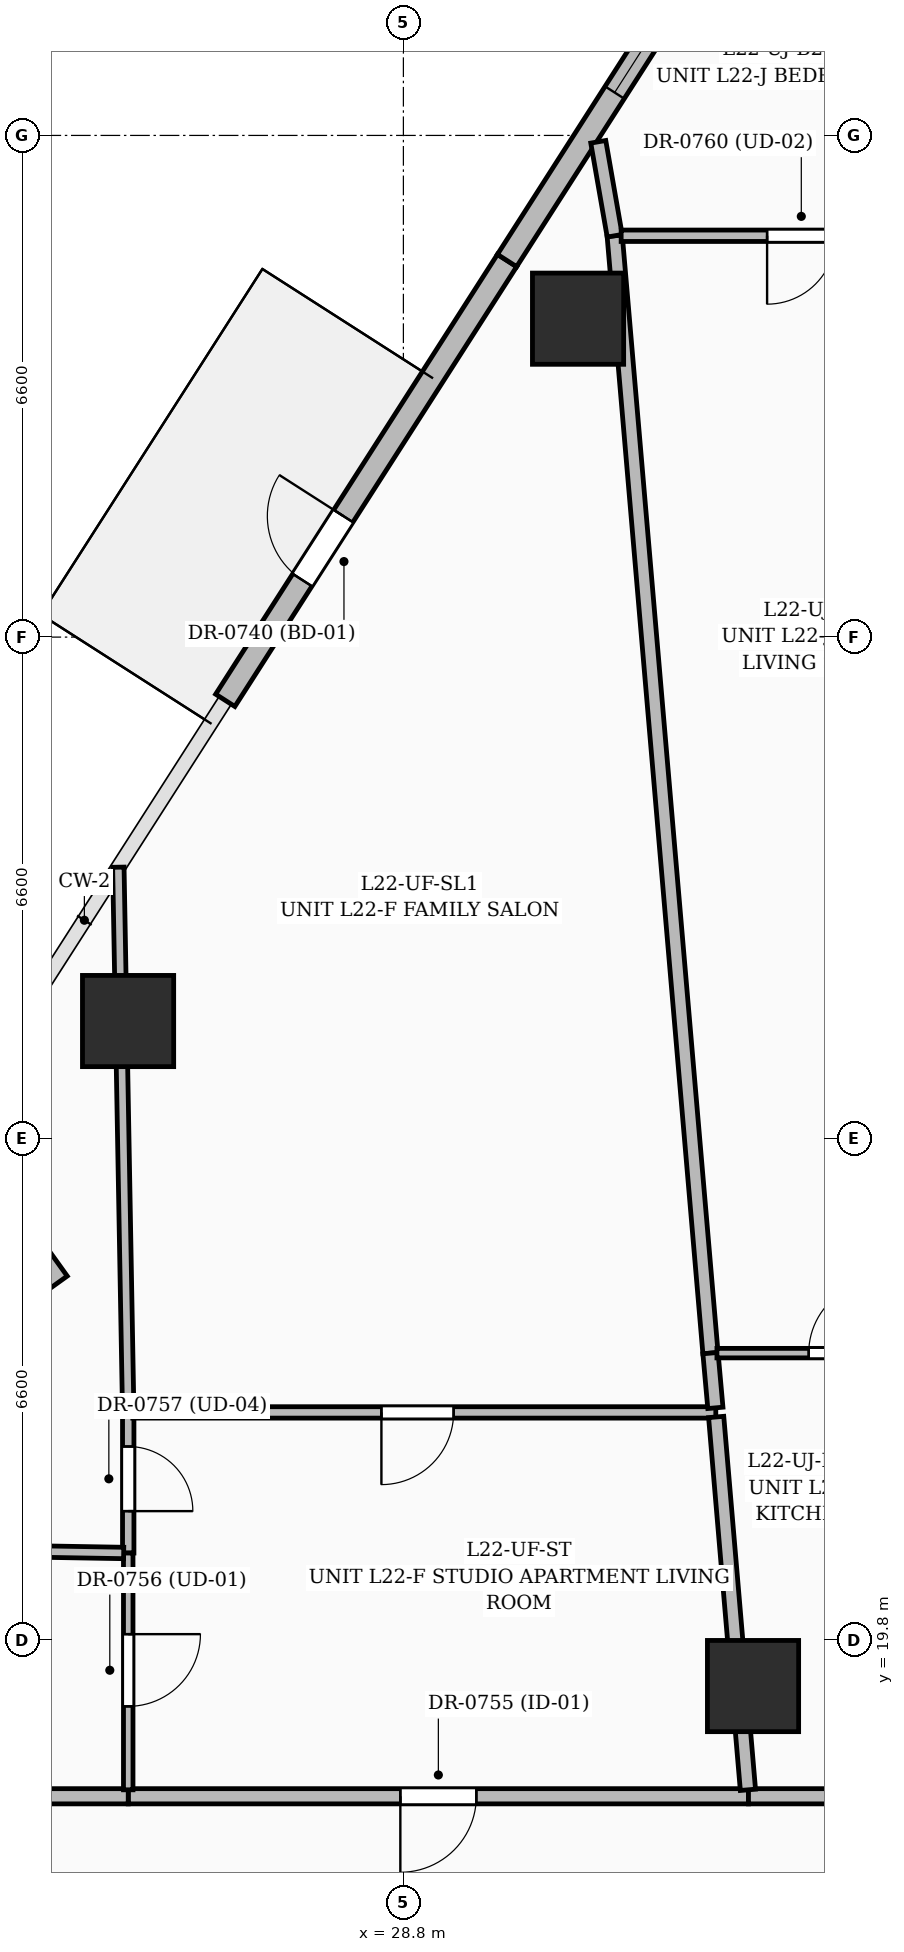
"""IFC4 building model, lengths in metres.
Left out: names, types, materials, properties, quantities, classifications, styles, units other than length and angle.
Written with IfcOpenShell. Run it as: python <this file> out.ifc"""

import sys

from ifc_helpers import new_model, si_unit, direction, frame, frame_2d, origin, origin_2d, place, context, subcontext, project, spatial, rectangle, extrude, element, fill, save


model = new_model("IFC4")
c1 = context("Model", 3, precision=1e-05, world=origin(), true_north=direction((0.0, 1.0)))
c2 = subcontext(c1, "Body", "Model", "MODEL_VIEW")
j1 = project(units=[si_unit("LENGTHUNIT", "METRE"), si_unit("PLANEANGLEUNIT", "RADIAN")], contexts=[c1])
p1 = place(None, origin())
s1 = spatial("IfcSite", under=j1, at=p1, CompositionType="ELEMENT")
p2 = place(p1, origin())
s2 = spatial("IfcBuilding", under=s1, at=p2, CompositionType="ELEMENT")
p3 = place(p2, frame((0.0, 0.0, 89.4)))
s3 = spatial("IfcBuildingStorey", under=s2, at=p3, CompositionType="ELEMENT", Elevation=89.4)
for number, where, z_axis, x_axis in (
    (1, (33.4, 19.2, 0.0), (0.0, 0.0, 1.0), (1.0, 0.0, 0.0)),
    (2, (31.098, 37.189, 0.0), (0.0, 0.0, 1.0), (1.0, 0.0, 0.0)),
    (3, (25.178, 27.949, 0.0), (0.0, 0.0, 1.0), (1.0, 0.0, 0.0)),
):
    element("IfcColumn", number, at=place(p3, frame(where, z_axis=z_axis, x_axis=x_axis)), inside=s3, PredefinedType="COLUMN", context=c2, shape_type="SweptSolid", body=[
        extrude(rectangle(XDim=1.2, YDim=1.2, at=origin_2d()), origin(), (0.0, 0.0, 1.0), 3.6),
    ])
p4 = place(p3, frame((24.256, 24.506, 0.0), z_axis=(0.0, 0.0, 1.0), x_axis=(-0.58299973372, 0.812472344442, 0.0)))
e4 = element("IfcWall", 4, at=p4, inside=s3, PredefinedType="SOLIDWALL", context=c2, shape_type="SweptSolid", body=[
    extrude(rectangle(XDim=2.594, YDim=0.3, at=frame_2d((1.297, 0.0))), origin(), (0.0, 0.0, 1.0), 2.375),
])
p5 = place(p3, frame((26.457, 32.168, 0.0), z_axis=(0.0, 0.0, 1.0), x_axis=(0.539456903464, 0.842013212072, 0.0)))
e5 = element("IfcWall", 5, at=p5, inside=s3, PredefinedType="SOLIDWALL", context=c2, shape_type="SweptSolid", body=[
    extrude(rectangle(XDim=6.872, YDim=0.3, at=frame_2d((3.436, 0.0))), origin(), (0.0, 0.0, 1.0), 3.35),
])
p6 = place(p5, frame((1.88, 0.0, 0.0)))
e6 = element("IfcOpeningElement", 6, at=p6, cuts=e5, PredefinedType="OPENING", context=c2, shape_type="SweptSolid", body=[
    extrude(rectangle(XDim=1.0, YDim=2.2, at=frame_2d((0.5, 1.1))), frame((0.0, 0.16, 0.0), z_axis=(0.0, -1.0, 0.0), x_axis=(1.0, 0.0, 0.0)), (0.0, 0.0, 1.0), 0.32),
])
p7 = place(p3, frame((30.164, 37.954, 0.0), z_axis=(0.0, 0.0, 1.0), x_axis=(0.539473041718, 0.842002872477, 0.0)))
e7 = element("IfcWall", 7, at=p7, inside=s3, PredefinedType="SOLIDWALL", context=c2, shape_type="SweptSolid", body=[
    extrude(rectangle(XDim=6.872, YDim=0.3, at=frame_2d((3.436, 0.0))), origin(), (0.0, 0.0, 1.0), 3.35),
])
p8 = place(p7, frame((2.625, 0.0, 0.6)))
e8 = element("IfcOpeningElement", 8, at=p8, cuts=e7, PredefinedType="OPENING", context=c2, shape_type="SweptSolid", body=[
    extrude(rectangle(XDim=1.8, YDim=2.1, at=frame_2d((0.9, 1.05))), frame((0.0, 0.16, 0.0), z_axis=(0.0, -1.0, 0.0), x_axis=(1.0, 0.0, 0.0)), (0.0, 0.0, 1.0), 0.32),
])
p9 = place(p3, frame((33.34, 17.75, 0.0), z_axis=(0.0, 0.0, 1.0), x_axis=(-1.0, 0.0, 0.0)))
e9 = element("IfcWall", 9, at=p9, inside=s3, PredefinedType="PARTITIONING", context=c2, shape_type="SweptSolid", body=[
    extrude(rectangle(XDim=8.16, YDim=0.2, at=frame_2d((4.08, 0.0))), origin(), (0.0, 0.0, 1.0), 2.771),
])
p10 = place(p9, frame((3.58, 0.0, 0.0)))
e10 = element("IfcOpeningElement", 10, at=p10, cuts=e9, PredefinedType="OPENING", context=c2, shape_type="SweptSolid", body=[
    extrude(rectangle(XDim=1.0, YDim=2.2, at=frame_2d((0.5, 1.1))), frame((0.0, 0.11, 0.0), z_axis=(0.0, -1.0, 0.0), x_axis=(1.0, 0.0, 0.0)), (0.0, 0.0, 1.0), 0.22),
])
p11 = place(p3, frame((25.18, 17.75, 0.0), z_axis=(0.0, 0.0, 1.0), x_axis=(-1.0, 0.0, 0.0)))
e11 = element("IfcWall", 11, at=p11, inside=s3, PredefinedType="PARTITIONING", context=c2, shape_type="SweptSolid", body=[
    extrude(rectangle(XDim=3.695, YDim=0.2, at=frame_2d((1.847, 0.0))), origin(), (0.0, 0.0, 1.0), 2.345),
])
p12 = place(p3, frame((34.57, 17.75, 0.0), z_axis=(0.0, 0.0, 1.0), x_axis=(-1.0, 0.0, 0.0)))
e12 = element("IfcWall", 12, at=p12, inside=s3, PredefinedType="PARTITIONING", context=c2, shape_type="SweptSolid", body=[
    extrude(rectangle(XDim=1.23, YDim=0.2, at=frame_2d((0.615, 0.0))), origin(), (0.0, 0.0, 1.0), 2.309),
])
p13 = place(p3, frame((25.18, 22.8, 0.0), z_axis=(0.0, 0.0, 1.0), x_axis=(0.0, -1.0, 0.0)))
e13 = element("IfcWall", 13, at=p13, inside=s3, PredefinedType="PARTITIONING", context=c2, shape_type="SweptSolid", body=[
    extrude(rectangle(XDim=1.85, YDim=0.15, at=frame_2d((0.925, 0.0))), origin(), (0.0, 0.0, 1.0), 2.771),
])
p14 = place(p13, frame((0.448, 0.0, 0.0)))
e14 = element("IfcOpeningElement", 14, at=p14, cuts=e13, PredefinedType="OPENING", context=c2, shape_type="SweptSolid", body=[
    extrude(rectangle(XDim=0.85, YDim=2.1, at=frame_2d((0.425, 1.05))), frame((0.0, 0.085, 0.0), z_axis=(0.0, -1.0, 0.0), x_axis=(1.0, 0.0, 0.0)), (0.0, 0.0, 1.0), 0.17),
])
p15 = place(p3, frame((25.18, 20.95, 0.0), z_axis=(0.0, 0.0, 1.0), x_axis=(0.0, -1.0, 0.0)))
e15 = element("IfcWall", 15, at=p15, inside=s3, PredefinedType="PARTITIONING", context=c2, shape_type="SweptSolid", body=[
    extrude(rectangle(XDim=3.115, YDim=0.125, at=frame_2d((1.558, 0.0))), origin(), (0.0, 0.0, 1.0), 2.771),
])
p16 = place(p15, frame((1.067, 0.0, 0.0)))
e16 = element("IfcOpeningElement", 16, at=p16, cuts=e15, PredefinedType="OPENING", context=c2, shape_type="SweptSolid", body=[
    extrude(rectangle(XDim=0.95, YDim=2.2, at=frame_2d((0.475, 1.1))), frame((0.0, 0.072, 0.0), z_axis=(0.0, -1.0, 0.0), x_axis=(1.0, 0.0, 0.0)), (0.0, 0.0, 1.0), 0.145),
])
p17 = place(p3, frame((32.91, 22.8, 0.0), z_axis=(0.0, 0.0, 1.0), x_axis=(-1.0, 0.0, 0.0)))
e17 = element("IfcWall", 17, at=p17, inside=s3, PredefinedType="PARTITIONING", context=c2, shape_type="SweptSolid", body=[
    extrude(rectangle(XDim=7.67, YDim=0.15, at=frame_2d((3.835, 0.0))), origin(), (0.0, 0.0, 1.0), 2.345),
])
p18 = place(p17, frame((3.449, 0.0, 0.0)))
e18 = element("IfcOpeningElement", 18, at=p18, cuts=e17, PredefinedType="OPENING", context=c2, shape_type="SweptSolid", body=[
    extrude(rectangle(XDim=0.95, YDim=2.2, at=frame_2d((0.475, 1.1))), frame((0.0, 0.085, 0.0), z_axis=(0.0, -1.0, 0.0), x_axis=(1.0, 0.0, 0.0)), (0.0, 0.0, 1.0), 0.17),
])
p19 = place(p3, frame((33.333, 17.835, 0.0), z_axis=(0.0, 0.0, 1.0), x_axis=(-0.08484696782, 0.996393994388, 0.0)))
e19 = element("IfcWall", 19, at=p19, inside=s3, PredefinedType="PARTITIONING", context=c2, shape_type="SweptSolid", body=[
    extrude(rectangle(XDim=4.923, YDim=0.2, at=frame_2d((2.462, 0.0))), origin(), (0.0, 0.0, 1.0), 2.345),
])
p20 = place(p3, frame((19.472, 21.048, 0.0), z_axis=(0.0, 0.0, 1.0), x_axis=(0.999851310631, -0.017244031681, 0.0)))
e20 = element("IfcWall", 20, at=p20, inside=s3, PredefinedType="PARTITIONING", context=c2, shape_type="SweptSolid", body=[
    extrude(rectangle(XDim=5.649, YDim=0.15, at=frame_2d((2.824, 0.0))), origin(), (0.0, 0.0, 1.0), 2.37),
])
p21 = place(p3, frame((25.18, 22.8, 0.0), z_axis=(0.0, 0.0, 1.0), x_axis=(-0.018104588305, 0.999836098509, 0.0)))
e21 = element("IfcWall", 21, at=p21, inside=s3, PredefinedType="PARTITIONING", context=c2, shape_type="SweptSolid", body=[
    extrude(rectangle(XDim=7.174, YDim=0.15, at=frame_2d((3.587, 0.0))), origin(), (0.0, 0.0, 1.0), 2.37),
])
p22 = place(p3, frame((32.84, 23.58, 0.0), z_axis=(0.0, 0.0, 1.0), x_axis=(-0.085402080026, 0.996346568583, 0.0)))
e22 = element("IfcWall", 22, at=p22, inside=s3, PredefinedType="PARTITIONING", context=c2, shape_type="SweptSolid", body=[
    extrude(rectangle(XDim=14.754, YDim=0.2, at=frame_2d((7.377, 0.0))), origin(), (0.0, 0.0, 1.0), 2.345),
])
p23 = place(p3, frame((32.905, 22.86, 0.0), z_axis=(0.0, 0.0, 1.0), x_axis=(-0.089135306775, 0.996019526458, 0.0)))
e23 = element("IfcWall", 23, at=p23, inside=s3, PredefinedType="PARTITIONING", context=c2, shape_type="SweptSolid", body=[
    extrude(rectangle(XDim=0.723, YDim=0.2, at=frame_2d((0.362, 0.0))), origin(), (0.0, 0.0, 1.0), 3.35),
])
p24 = place(p3, frame((31.58, 38.28, 0.0), z_axis=(0.0, 0.0, 1.0), x_axis=(-0.172186828925, 0.985064310563, 0.0)))
e24 = element("IfcWall", 24, at=p24, inside=s3, PredefinedType="PARTITIONING", context=c2, shape_type="SweptSolid", body=[
    extrude(rectangle(XDim=1.255, YDim=0.2, at=frame_2d((0.627, 0.0))), origin(), (0.0, 0.0, 1.0), 3.35),
])
p25 = place(p3, frame((32.925, 23.58, 0.0), z_axis=(0.0, 0.0, 1.0), x_axis=(1.0, 0.0, 0.0)))
e25 = element("IfcWall", 25, at=p25, inside=s3, PredefinedType="PARTITIONING", context=c2, shape_type="SweptSolid", body=[
    extrude(rectangle(XDim=3.505, YDim=0.125, at=frame_2d((1.752, 0.0))), origin(), (0.0, 0.0, 1.0), 2.309),
])
p26 = place(p25, frame((1.208, 0.0, 0.0)))
e26 = element("IfcOpeningElement", 26, at=p26, cuts=e25, PredefinedType="OPENING", context=c2, shape_type="SweptSolid", body=[
    extrude(rectangle(XDim=0.95, YDim=2.2, at=frame_2d((0.475, 1.1))), frame((0.0, 0.072, 0.0), z_axis=(0.0, -1.0, 0.0), x_axis=(1.0, 0.0, 0.0)), (0.0, 0.0, 1.0), 0.145),
])
p27 = place(p3, frame((36.417, 38.28, 0.0), z_axis=(0.0, 0.0, 1.0), x_axis=(-1.0, 0.0, 0.0)))
e27 = element("IfcWall", 27, at=p27, inside=s3, PredefinedType="PARTITIONING", context=c2, shape_type="SweptSolid", body=[
    extrude(rectangle(XDim=4.752, YDim=0.15, at=frame_2d((2.376, 0.0))), origin(), (0.0, 0.0, 1.0), 3.35),
])
p28 = place(p27, frame((1.933, 0.0, 0.0)))
e28 = element("IfcOpeningElement", 28, at=p28, cuts=e27, PredefinedType="OPENING", context=c2, shape_type="SweptSolid", body=[
    extrude(rectangle(XDim=0.9, YDim=2.15, at=frame_2d((0.45, 1.075))), frame((0.0, 0.085, 0.0), z_axis=(0.0, -1.0, 0.0), x_axis=(1.0, 0.0, 0.0)), (0.0, 0.0, 1.0), 0.17),
])
p29 = place(p6, origin())
e29 = element("IfcDoor", 29, at=p29, inside=s3, OperationType="SINGLE_SWING_RIGHT", PredefinedType="DOOR", context=c2, shape_type="SweptSolid", body=[
    extrude(rectangle(XDim=1.0, YDim=2.2, at=frame_2d((0.5, 1.1))), frame((0.0, 0.025, 0.0), z_axis=(0.0, -1.0, 0.0), x_axis=(1.0, 0.0, 0.0)), (0.0, 0.0, 1.0), 0.05),
])
fill(e6, e29)
p30 = place(p8, origin())
e30 = element("IfcWindow", 30, at=p30, inside=s3, PartitioningType="SINGLE_PANEL", PredefinedType="WINDOW", context=c2, shape_type="SweptSolid", body=[
    extrude(rectangle(XDim=1.8, YDim=2.1, at=frame_2d((0.9, 1.05))), frame((0.0, 0.03, 0.0), z_axis=(0.0, -1.0, 0.0), x_axis=(1.0, 0.0, 0.0)), (0.0, 0.0, 1.0), 0.06),
])
fill(e8, e30)
p31 = place(p10, origin())
e31 = element("IfcDoor", 31, at=p31, inside=s3, OperationType="SINGLE_SWING_RIGHT", PredefinedType="DOOR", context=c2, shape_type="SweptSolid", body=[
    extrude(rectangle(XDim=1.0, YDim=2.2, at=frame_2d((0.5, 1.1))), frame((0.0, 0.025, 0.0), z_axis=(0.0, -1.0, 0.0), x_axis=(1.0, 0.0, 0.0)), (0.0, 0.0, 1.0), 0.05),
])
fill(e10, e31)
p32 = place(p16, origin())
e32 = element("IfcDoor", 32, at=p32, inside=s3, OperationType="SINGLE_SWING_LEFT", PredefinedType="DOOR", context=c2, shape_type="SweptSolid", body=[
    extrude(rectangle(XDim=0.95, YDim=2.2, at=frame_2d((0.475, 1.1))), frame((0.0, 0.025, 0.0), z_axis=(0.0, -1.0, 0.0), x_axis=(1.0, 0.0, 0.0)), (0.0, 0.0, 1.0), 0.05),
])
fill(e16, e32)
p33 = place(p14, origin())
e33 = element("IfcDoor", 33, at=p33, inside=s3, OperationType="SINGLE_SWING_RIGHT", PredefinedType="DOOR", context=c2, shape_type="SweptSolid", body=[
    extrude(rectangle(XDim=0.85, YDim=2.1, at=frame_2d((0.425, 1.05))), frame((0.0, 0.025, 0.0), z_axis=(0.0, -1.0, 0.0), x_axis=(1.0, 0.0, 0.0)), (0.0, 0.0, 1.0), 0.05),
])
fill(e14, e33)
p34 = place(p26, origin())
e34 = element("IfcDoor", 34, at=p34, inside=s3, OperationType="SINGLE_SWING_RIGHT", PredefinedType="DOOR", context=c2, shape_type="SweptSolid", body=[
    extrude(rectangle(XDim=0.95, YDim=2.2, at=frame_2d((0.475, 1.1))), frame((0.0, 0.025, 0.0), z_axis=(0.0, -1.0, 0.0), x_axis=(1.0, 0.0, 0.0)), (0.0, 0.0, 1.0), 0.05),
])
fill(e26, e34)
p35 = place(p28, origin())
e35 = element("IfcDoor", 35, at=p35, inside=s3, OperationType="SINGLE_SWING_RIGHT", PredefinedType="DOOR", context=c2, shape_type="SweptSolid", body=[
    extrude(rectangle(XDim=0.9, YDim=2.15, at=frame_2d((0.45, 1.075))), frame((0.0, 0.025, 0.0), z_axis=(0.0, -1.0, 0.0), x_axis=(1.0, 0.0, 0.0)), (0.0, 0.0, 1.0), 0.05),
])
fill(e28, e35)
p36 = place(p18, origin())
e36 = element("IfcDoor", 36, at=p36, inside=s3, OperationType="SINGLE_SWING_RIGHT", PredefinedType="DOOR", context=c2, shape_type="SweptSolid", body=[
    extrude(rectangle(XDim=0.95, YDim=2.2, at=frame_2d((0.475, 1.1))), frame((0.0, 0.025, 0.0), z_axis=(0.0, -1.0, 0.0), x_axis=(1.0, 0.0, 0.0)), (0.0, 0.0, 1.0), 0.05),
])
fill(e18, e36)
save(model, sys.argv[1])
